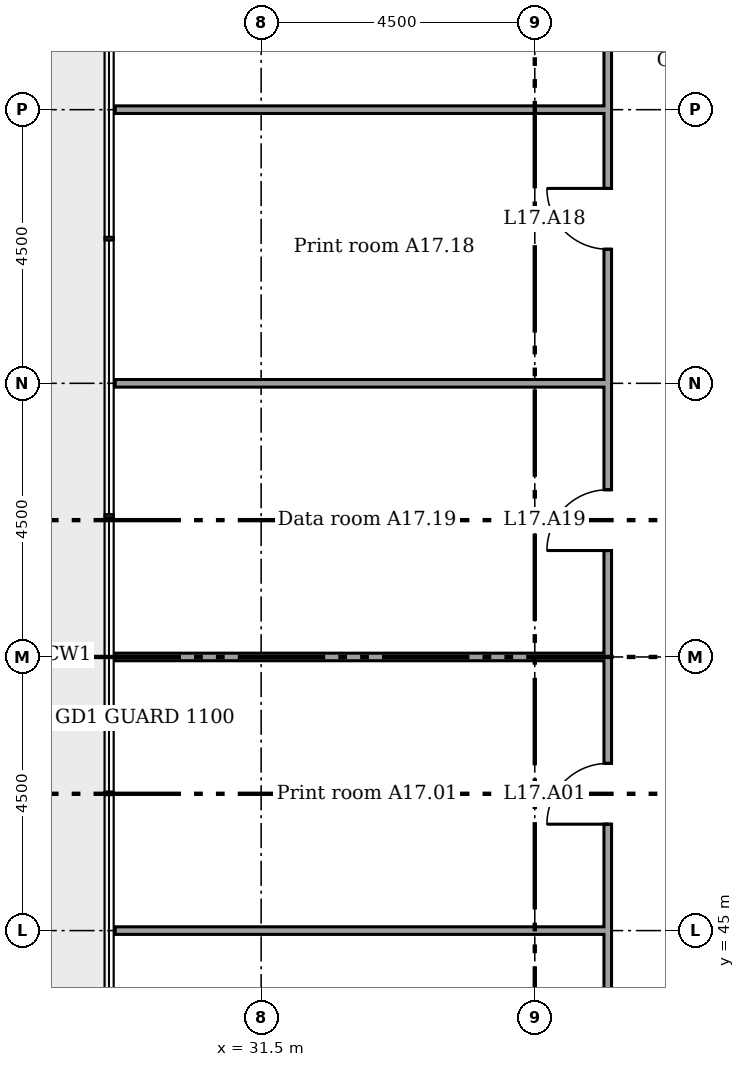
"""IFC4 building model, lengths in metres.
Left out: names, types, materials, properties, quantities, classifications, styles, units other than length and angle.
Written with IfcOpenShell. Run it as: python <this file> out.ifc"""

import sys

from ifc_helpers import new_model, si_unit, direction, frame, frame_2d, origin, place, context, subcontext, project, spatial, rectangle, extrude, element, fill, save


model = new_model("IFC4")
c1 = context("Model", 3, precision=1e-05, world=origin(), true_north=direction((0.0, 1.0)))
c2 = subcontext(c1, "Body", "Model", "MODEL_VIEW")
j1 = project(units=[si_unit("LENGTHUNIT", "METRE"), si_unit("PLANEANGLEUNIT", "RADIAN")], contexts=[c1])
p1 = place(None, origin())
s1 = spatial("IfcSite", under=j1, at=p1, CompositionType="ELEMENT")
p2 = place(p1, origin())
s2 = spatial("IfcBuilding", under=s1, at=p2, CompositionType="ELEMENT")
p3 = place(p2, frame((0.0, 0.0, 72.6)))
s3 = spatial("IfcBuildingStorey", under=s2, at=p3, CompositionType="ELEMENT", Elevation=72.6)
for number, where in (
    (1, (29.1, 45.0, 0.0)),
    (2, (29.1, 49.5, 0.0)),
    (3, (29.1, 54.0, 0.0)),
    (4, (29.1, 58.5, 0.0)),
):
    element("IfcWall", number, at=place(p3, frame(where)), inside=s3, PredefinedType="PARTITIONING", context=c2, shape_type="SweptSolid", body=[
        extrude(rectangle(XDim=8.1, YDim=0.125, at=frame_2d((4.05, 0.0))), origin(), (0.0, 0.0, 1.0), 2.766),
    ])
p4 = place(p3, frame((37.2, 38.762, 0.0), z_axis=(0.0, 0.0, 1.0), x_axis=(0.0, 1.0, 0.0)))
e5 = element("IfcWall", 5, at=p4, inside=s3, PredefinedType="PARTITIONING", context=c2, shape_type="SweptSolid", body=[
    extrude(rectangle(XDim=21.475, YDim=0.125, at=frame_2d((10.738, 0.0))), origin(), (0.0, 0.0, 1.0), 3.45),
])
p5 = place(p4, frame((7.988, 0.0, 0.0)))
e6 = element("IfcOpeningElement", 6, at=p5, cuts=e5, PredefinedType="OPENING", context=c2, shape_type="SweptSolid", body=[
    extrude(rectangle(XDim=1.0, YDim=2.1, at=frame_2d((0.5, 1.05))), frame((0.0, 0.073, 0.0), z_axis=(0.0, -1.0, 0.0), x_axis=(1.0, 0.0, 0.0)), (0.0, 0.0, 1.0), 0.145),
])
p6 = place(p4, frame((3.032, 0.0, 0.0)))
e7 = element("IfcOpeningElement", 7, at=p6, cuts=e5, PredefinedType="OPENING", context=c2, shape_type="SweptSolid", body=[
    extrude(rectangle(XDim=1.0, YDim=2.1, at=frame_2d((0.5, 1.05))), frame((0.0, 0.073, 0.0), z_axis=(0.0, -1.0, 0.0), x_axis=(1.0, 0.0, 0.0)), (0.0, 0.0, 1.0), 0.145),
])
p7 = place(p4, frame((17.442, 0.0, 0.0)))
e8 = element("IfcOpeningElement", 8, at=p7, cuts=e5, PredefinedType="OPENING", context=c2, shape_type="SweptSolid", body=[
    extrude(rectangle(XDim=1.0, YDim=2.1, at=frame_2d((0.5, 1.05))), frame((0.0, 0.073, 0.0), z_axis=(0.0, -1.0, 0.0), x_axis=(1.0, 0.0, 0.0)), (0.0, 0.0, 1.0), 0.145),
])
p8 = place(p4, frame((12.488, 0.0, 0.0)))
e9 = element("IfcOpeningElement", 9, at=p8, cuts=e5, PredefinedType="OPENING", context=c2, shape_type="SweptSolid", body=[
    extrude(rectangle(XDim=1.0, YDim=2.1, at=frame_2d((0.5, 1.05))), frame((0.0, 0.073, 0.0), z_axis=(0.0, -1.0, 0.0), x_axis=(1.0, 0.0, 0.0)), (0.0, 0.0, 1.0), 0.145),
])
p9 = place(p5, origin())
e10 = element("IfcDoor", 10, at=p9, inside=s3, OperationType="SINGLE_SWING_RIGHT", PredefinedType="DOOR", context=c2, shape_type="SweptSolid", body=[
    extrude(rectangle(XDim=1.0, YDim=2.1, at=frame_2d((0.5, 1.05))), frame((0.0, 0.025, 0.0), z_axis=(0.0, -1.0, 0.0), x_axis=(1.0, 0.0, 0.0)), (0.0, 0.0, 1.0), 0.05),
])
fill(e6, e10)
p10 = place(p7, origin())
e11 = element("IfcDoor", 11, at=p10, inside=s3, OperationType="SINGLE_SWING_LEFT", PredefinedType="DOOR", context=c2, shape_type="SweptSolid", body=[
    extrude(rectangle(XDim=1.0, YDim=2.1, at=frame_2d((0.5, 1.05))), frame((0.0, 0.025, 0.0), z_axis=(0.0, -1.0, 0.0), x_axis=(1.0, 0.0, 0.0)), (0.0, 0.0, 1.0), 0.05),
])
fill(e8, e11)
p11 = place(p8, origin())
e12 = element("IfcDoor", 12, at=p11, inside=s3, OperationType="SINGLE_SWING_RIGHT", PredefinedType="DOOR", context=c2, shape_type="SweptSolid", body=[
    extrude(rectangle(XDim=1.0, YDim=2.1, at=frame_2d((0.5, 1.05))), frame((0.0, 0.025, 0.0), z_axis=(0.0, -1.0, 0.0), x_axis=(1.0, 0.0, 0.0)), (0.0, 0.0, 1.0), 0.05),
])
fill(e9, e12)
save(model, sys.argv[1])
